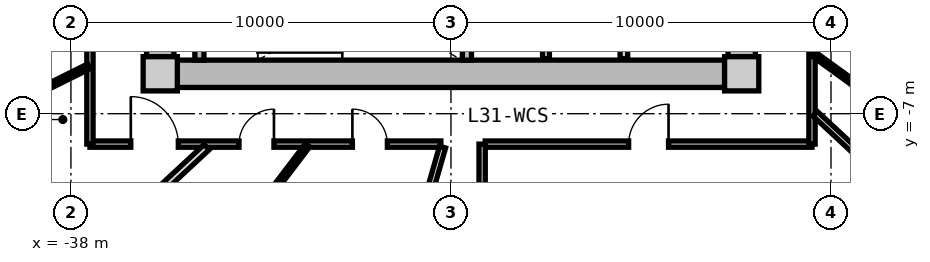
"""IFC4 building model, lengths in metres.
Left out: names, types, materials, properties, quantities, classifications, styles, units other than length and angle.
Written with IfcOpenShell. Run it as: python <this file> out.ifc"""

import sys

from ifc_helpers import new_model, si_unit, direction, frame, frame_2d, origin, origin_2d, place, context, subcontext, project, spatial, rectangle, extrude, source, transform, mapped, element, fill, save


model = new_model("IFC4")
c1 = context("Model", 3, precision=1e-05, world=origin(), true_north=direction((0.0, 1.0)))
c2 = subcontext(c1, "Body", "Model", "MODEL_VIEW")
j1 = project(units=[si_unit("LENGTHUNIT", "METRE"), si_unit("PLANEANGLEUNIT", "RADIAN")], contexts=[c1])
p1 = place(None, origin())
s1 = spatial("IfcSite", under=j1, at=p1, CompositionType="ELEMENT")
p2 = place(p1, origin())
s2 = spatial("IfcBuilding", under=s1, at=p2, CompositionType="ELEMENT")
p3 = place(p2, frame((0.0, 0.0, 102.35)))
s3 = spatial("IfcBuildingStorey", under=s2, at=p3, CompositionType="ELEMENT", Elevation=102.35)
m1 = source(origin(), c2, "Body", "SweptSolid", [
    extrude(rectangle(XDim=0.9, YDim=0.9, at=origin_2d()), origin(), (0.0, 0.0, 1.0), 3.05),
])
for number, where, z_axis, x_axis in (
    (1, (-35.65, -5.95, 0.0), (0.0, 0.0, 1.0), (1.0, 0.0, 0.0)),
    (2, (-20.35, -5.95, 0.0), (0.0, 0.0, 1.0), (1.0, 0.0, 0.0)),
):
    element("IfcColumn", number, at=place(p3, frame(where, z_axis=z_axis, x_axis=x_axis)), inside=s3, PredefinedType="COLUMN", context=c2, shape_type="MappedRepresentation", body=[
        mapped(m1, transform((0.0, 0.0, 0.0), x_axis=(1.0, 0.0, 0.0), y_axis=(0.0, 1.0, 0.0), z_axis=(0.0, 0.0, 1.0), scale=1.0)),
    ])
m2 = source(origin(), c2, "Body", "SweptSolid", [
    extrude(rectangle(XDim=14.4, YDim=0.72, at=frame_2d((7.2, 0.0))), origin(), (0.0, 0.0, 1.0), 2.79),
])
p4 = place(p3, frame((-20.8, -5.95, 0.0), z_axis=(0.0, 0.0, 1.0), x_axis=(-1.0, 0.0, 0.0)))
e3 = element("IfcWall", 3, at=p4, inside=s3, PredefinedType="SHEAR", context=c2, shape_type="MappedRepresentation", body=[
    mapped(m2, transform((0.0, 0.0, 0.0), x_axis=(1.0, 0.0, 0.0), y_axis=(0.0, 1.0, 0.0), z_axis=(0.0, 0.0, 1.0), scale=1.0)),
])
m3 = source(origin(), c2, "Body", "SweptSolid", [
    extrude(rectangle(XDim=11.0, YDim=0.72, at=frame_2d((5.5, 0.0))), origin(), (0.0, 0.0, 1.0), 2.79),
])
p5 = place(p3, frame((-35.65, -5.5, 0.0), z_axis=(0.0, 0.0, 1.0), x_axis=(0.0, 1.0, 0.0)))
e4 = element("IfcWall", 4, at=p5, inside=s3, PredefinedType="SHEAR", context=c2, shape_type="MappedRepresentation", body=[
    mapped(m3, transform((0.0, 0.0, 0.0), x_axis=(1.0, 0.0, 0.0), y_axis=(0.0, 1.0, 0.0), z_axis=(0.0, 0.0, 1.0), scale=1.0)),
])
p6 = place(p5, frame((3.8, 0.0, 0.0)))
e5 = element("IfcOpeningElement", 5, at=p6, cuts=e4, PredefinedType="OPENING", context=c2, shape_type="SweptSolid", body=[
    extrude(rectangle(XDim=1.2, YDim=2.15, at=frame_2d((0.6, 1.075))), frame((0.0, 0.37, 0.0), z_axis=(0.0, -1.0, 0.0), x_axis=(1.0, 0.0, 0.0)), (0.0, 0.0, 1.0), 0.74),
])
p7 = place(p3, frame((-20.35, 5.5, 0.0), z_axis=(0.0, 0.0, 1.0), x_axis=(0.0, -1.0, 0.0)))
e6 = element("IfcWall", 6, at=p7, inside=s3, PredefinedType="SHEAR", context=c2, shape_type="MappedRepresentation", body=[
    mapped(m3, transform((0.0, 0.0, 0.0), x_axis=(1.0, 0.0, 0.0), y_axis=(0.0, 1.0, 0.0), z_axis=(0.0, 0.0, 1.0), scale=1.0)),
])
p8 = place(p7, frame((5.65, 0.0, 0.0)))
e7 = element("IfcOpeningElement", 7, at=p8, cuts=e6, PredefinedType="OPENING", context=c2, shape_type="SweptSolid", body=[
    extrude(rectangle(XDim=1.2, YDim=2.15, at=frame_2d((0.6, 1.075))), frame((0.0, 0.37, 0.0), z_axis=(0.0, -1.0, 0.0), x_axis=(1.0, 0.0, 0.0)), (0.0, 0.0, 1.0), 0.74),
])
m4 = source(origin(), c2, "Body", "SweptSolid", [
    extrude(rectangle(XDim=3.14, YDim=0.24, at=frame_2d((1.57, 0.0))), origin(), (0.0, 0.0, 1.0), 2.79),
])
for number, where, z_axis, x_axis in (
    (8, (-34.62, -5.59, 0.0), (0.0, 0.0, 1.0), (0.0, 1.0, 0.0)),
    (9, (-27.58, -5.59, 0.0), (0.0, 0.0, 1.0), (0.0, 1.0, 0.0)),
):
    element("IfcWall", number, at=place(p3, frame(where, z_axis=z_axis, x_axis=x_axis)), inside=s3, PredefinedType="PARTITIONING", context=c2, shape_type="MappedRepresentation", body=[
        mapped(m4, transform((0.0, 0.0, 0.0), x_axis=(1.0, 0.0, 0.0), y_axis=(0.0, 1.0, 0.0), z_axis=(0.0, 0.0, 1.0), scale=1.0)),
    ])
m5 = source(origin(), c2, "Body", "SweptSolid", [
    extrude(rectangle(XDim=3.8, YDim=0.2, at=frame_2d((1.9, 0.0))), origin(), (0.0, 0.0, 1.0), 2.775),
])
p9 = place(p3, frame((-23.45, -5.55, 0.0), z_axis=(0.0, 0.0, 1.0), x_axis=(0.0, 1.0, 0.0)))
e10 = element("IfcWall", 10, at=p9, inside=s3, PredefinedType="PARTITIONING", context=c2, shape_type="MappedRepresentation", body=[
    mapped(m5, transform((0.0, 0.0, 0.0), x_axis=(1.0, 0.0, 0.0), y_axis=(0.0, 1.0, 0.0), z_axis=(0.0, 0.0, 1.0), scale=1.0)),
])
m6 = source(origin(), c2, "Body", "SweptSolid", [
    extrude(rectangle(XDim=3.22, YDim=0.18, at=frame_2d((1.61, 0.0))), origin(), (0.0, 0.0, 1.0), 2.775),
])
p10 = place(p3, frame((-25.5, -5.55, 0.0), z_axis=(0.0, 0.0, 1.0), x_axis=(0.0, 1.0, 0.0)))
e11 = element("IfcWall", 11, at=p10, inside=s3, PredefinedType="PARTITIONING", context=c2, shape_type="MappedRepresentation", body=[
    mapped(m6, transform((0.0, 0.0, 0.0), x_axis=(1.0, 0.0, 0.0), y_axis=(0.0, 1.0, 0.0), z_axis=(0.0, 0.0, 1.0), scale=1.0)),
])
m7 = source(origin(), c2, "Body", "SweptSolid", [
    extrude(rectangle(XDim=8.6, YDim=0.165, at=frame_2d((4.3, 0.0))), origin(), (0.0, 0.0, 1.0), 2.775),
])
p11 = place(p3, frame((-18.5, -7.8, 0.0), z_axis=(0.0, 0.0, 1.0), x_axis=(-1.0, 0.0, 0.0)))
e12 = element("IfcWall", 12, at=p11, inside=s3, PredefinedType="PARTITIONING", context=c2, shape_type="MappedRepresentation", body=[
    mapped(m7, transform((0.0, 0.0, 0.0), x_axis=(1.0, 0.0, 0.0), y_axis=(0.0, 1.0, 0.0), z_axis=(0.0, 0.0, 1.0), scale=1.0)),
])
p12 = place(p11, frame((3.775, 0.0, 0.0)))
e13 = element("IfcOpeningElement", 13, at=p12, cuts=e12, PredefinedType="OPENING", context=c2, shape_type="SweptSolid", body=[
    extrude(rectangle(XDim=1.05, YDim=2.15, at=frame_2d((0.525, 1.075))), frame((0.0, 0.093, 0.0), z_axis=(0.0, -1.0, 0.0), x_axis=(1.0, 0.0, 0.0)), (0.0, 0.0, 1.0), 0.185),
])
m8 = source(origin(), c2, "Body", "SweptSolid", [
    extrude(rectangle(XDim=9.234, YDim=0.165, at=frame_2d((4.617, 0.0))), origin(), (0.0, 0.0, 1.0), 2.775),
])
p13 = place(p3, frame((-28.266, -7.8, 0.0), z_axis=(0.0, 0.0, 1.0), x_axis=(-1.0, 0.0, 0.0)))
e14 = element("IfcWall", 14, at=p13, inside=s3, PredefinedType="PARTITIONING", context=c2, shape_type="MappedRepresentation", body=[
    mapped(m8, transform((0.0, 0.0, 0.0), x_axis=(1.0, 0.0, 0.0), y_axis=(0.0, 1.0, 0.0), z_axis=(0.0, 0.0, 1.0), scale=1.0)),
])
p14 = place(p13, frame((6.909, 0.0, 0.0)))
e15 = element("IfcOpeningElement", 15, at=p14, cuts=e14, PredefinedType="OPENING", context=c2, shape_type="SweptSolid", body=[
    extrude(rectangle(XDim=1.25, YDim=2.2, at=frame_2d((0.625, 1.1))), frame((0.0, 0.093, 0.0), z_axis=(0.0, -1.0, 0.0), x_axis=(1.0, 0.0, 0.0)), (0.0, 0.0, 1.0), 0.185),
])
p15 = place(p13, frame((4.392, 0.0, 0.0)))
e16 = element("IfcOpeningElement", 16, at=p15, cuts=e14, PredefinedType="OPENING", context=c2, shape_type="SweptSolid", body=[
    extrude(rectangle(XDim=0.92, YDim=2.1, at=frame_2d((0.46, 1.05))), frame((0.0, 0.093, 0.0), z_axis=(0.0, -1.0, 0.0), x_axis=(1.0, 0.0, 0.0)), (0.0, 0.0, 1.0), 0.185),
])
p16 = place(p13, frame((1.408, 0.0, 0.0)))
e17 = element("IfcOpeningElement", 17, at=p16, cuts=e14, PredefinedType="OPENING", context=c2, shape_type="SweptSolid", body=[
    extrude(rectangle(XDim=0.92, YDim=2.1, at=frame_2d((0.46, 1.05))), frame((0.0, 0.093, 0.0), z_axis=(0.0, -1.0, 0.0), x_axis=(1.0, 0.0, 0.0)), (0.0, 0.0, 1.0), 0.185),
])
m9 = source(origin(), c2, "Body", "SweptSolid", [
    extrude(rectangle(XDim=15.6, YDim=0.165, at=frame_2d((7.8, 0.0))), origin(), (0.0, 0.0, 1.0), 2.775),
])
p17 = place(p3, frame((-37.5, -7.8, 0.0), z_axis=(0.0, 0.0, 1.0), x_axis=(0.0, 1.0, 0.0)))
e18 = element("IfcWall", 18, at=p17, inside=s3, PredefinedType="PARTITIONING", context=c2, shape_type="MappedRepresentation", body=[
    mapped(m9, transform((0.0, 0.0, 0.0), x_axis=(1.0, 0.0, 0.0), y_axis=(0.0, 1.0, 0.0), z_axis=(0.0, 0.0, 1.0), scale=1.0)),
])
p18 = place(p17, frame((11.994, 0.0, 0.0)))
e19 = element("IfcOpeningElement", 19, at=p18, cuts=e18, PredefinedType="OPENING", context=c2, shape_type="SweptSolid", body=[
    extrude(rectangle(XDim=1.25, YDim=2.2, at=frame_2d((0.625, 1.1))), frame((0.0, 0.093, 0.0), z_axis=(0.0, -1.0, 0.0), x_axis=(1.0, 0.0, 0.0)), (0.0, 0.0, 1.0), 0.185),
])
p19 = place(p17, frame((7.984, 0.0, 0.0)))
e20 = element("IfcOpeningElement", 20, at=p19, cuts=e18, PredefinedType="OPENING", context=c2, shape_type="SweptSolid", body=[
    extrude(rectangle(XDim=1.05, YDim=2.15, at=frame_2d((0.525, 1.075))), frame((0.0, 0.093, 0.0), z_axis=(0.0, -1.0, 0.0), x_axis=(1.0, 0.0, 0.0)), (0.0, 0.0, 1.0), 0.185),
])
p20 = place(p17, frame((5.777, 0.0, 0.0)))
e21 = element("IfcOpeningElement", 21, at=p20, cuts=e18, PredefinedType="OPENING", context=c2, shape_type="SweptSolid", body=[
    extrude(rectangle(XDim=1.05, YDim=2.15, at=frame_2d((0.525, 1.075))), frame((0.0, 0.093, 0.0), z_axis=(0.0, -1.0, 0.0), x_axis=(1.0, 0.0, 0.0)), (0.0, 0.0, 1.0), 0.185),
])
p21 = place(p3, frame((-18.5, 7.8, 0.0), z_axis=(0.0, 0.0, 1.0), x_axis=(0.0, -1.0, 0.0)))
e22 = element("IfcWall", 22, at=p21, inside=s3, PredefinedType="PARTITIONING", context=c2, shape_type="MappedRepresentation", body=[
    mapped(m9, transform((0.0, 0.0, 0.0), x_axis=(1.0, 0.0, 0.0), y_axis=(0.0, 1.0, 0.0), z_axis=(0.0, 0.0, 1.0), scale=1.0)),
])
p22 = place(p21, frame((12.002, 0.0, 0.0)))
e23 = element("IfcOpeningElement", 23, at=p22, cuts=e22, PredefinedType="OPENING", context=c2, shape_type="SweptSolid", body=[
    extrude(rectangle(XDim=1.05, YDim=2.15, at=frame_2d((0.525, 1.075))), frame((0.0, 0.093, 0.0), z_axis=(0.0, -1.0, 0.0), x_axis=(1.0, 0.0, 0.0)), (0.0, 0.0, 1.0), 0.185),
])
p23 = place(p21, frame((10.211, 0.0, 0.0)))
e24 = element("IfcOpeningElement", 24, at=p23, cuts=e22, PredefinedType="OPENING", context=c2, shape_type="SweptSolid", body=[
    extrude(rectangle(XDim=1.05, YDim=2.15, at=frame_2d((0.525, 1.075))), frame((0.0, 0.093, 0.0), z_axis=(0.0, -1.0, 0.0), x_axis=(1.0, 0.0, 0.0)), (0.0, 0.0, 1.0), 0.185),
])
p24 = place(p21, frame((7.722, 0.0, 0.0)))
e25 = element("IfcOpeningElement", 25, at=p24, cuts=e22, PredefinedType="OPENING", context=c2, shape_type="SweptSolid", body=[
    extrude(rectangle(XDim=1.05, YDim=2.15, at=frame_2d((0.525, 1.075))), frame((0.0, 0.093, 0.0), z_axis=(0.0, -1.0, 0.0), x_axis=(1.0, 0.0, 0.0)), (0.0, 0.0, 1.0), 0.185),
])
p25 = place(p21, frame((6.291, 0.0, 0.0)))
e26 = element("IfcOpeningElement", 26, at=p25, cuts=e22, PredefinedType="OPENING", context=c2, shape_type="SweptSolid", body=[
    extrude(rectangle(XDim=1.05, YDim=2.15, at=frame_2d((0.525, 1.075))), frame((0.0, 0.093, 0.0), z_axis=(0.0, -1.0, 0.0), x_axis=(1.0, 0.0, 0.0)), (0.0, 0.0, 1.0), 0.185),
])
p26 = place(p21, frame((2.465, 0.0, 0.0)))
e27 = element("IfcOpeningElement", 27, at=p26, cuts=e22, PredefinedType="OPENING", context=c2, shape_type="SweptSolid", body=[
    extrude(rectangle(XDim=1.25, YDim=2.2, at=frame_2d((0.625, 1.1))), frame((0.0, 0.093, 0.0), z_axis=(0.0, -1.0, 0.0), x_axis=(1.0, 0.0, 0.0)), (0.0, 0.0, 1.0), 0.185),
])
m10 = source(origin(), c2, "Body", "SweptSolid", [
    extrude(rectangle(XDim=8.989, YDim=0.165, at=frame_2d((4.495, 0.0))), origin(), (0.0, 0.0, 1.0), 2.275),
])
p27 = place(p3, frame((-28.222, -7.88, 0.0), z_axis=(0.0, 0.0, 1.0), x_axis=(-0.27702323008, -0.960863221274, 0.0)))
e28 = element("IfcWall", 28, at=p27, inside=s3, PredefinedType="PARTITIONING", context=c2, shape_type="MappedRepresentation", body=[
    mapped(m10, transform((0.0, 0.0, 0.0), x_axis=(1.0, 0.0, 0.0), y_axis=(0.0, 1.0, 0.0), z_axis=(0.0, 0.0, 1.0), scale=1.0)),
])
m11 = source(origin(), c2, "Body", "SweptSolid", [
    extrude(rectangle(XDim=7.482, YDim=0.165, at=frame_2d((3.741, 0.0))), origin(), (0.0, 0.0, 1.0), 2.275),
])
p28 = place(p3, frame((-18.42, -6.998, 0.0), z_axis=(0.0, 0.0, 1.0), x_axis=(0.732508698043, -0.680757671489, 0.0)))
e29 = element("IfcWall", 29, at=p28, inside=s3, PredefinedType="PARTITIONING", context=c2, shape_type="MappedRepresentation", body=[
    mapped(m11, transform((0.0, 0.0, 0.0), x_axis=(1.0, 0.0, 0.0), y_axis=(0.0, 1.0, 0.0), z_axis=(0.0, 0.0, 1.0), scale=1.0)),
])
m12 = source(origin(), c2, "Body", "SweptSolid", [
    extrude(rectangle(XDim=7.56, YDim=0.165, at=frame_2d((3.78, 0.0))), origin(), (0.0, 0.0, 1.0), 2.775),
])
p29 = place(p3, frame((-27.18, -15.36, 0.0), z_axis=(0.0, 0.0, 1.0), x_axis=(0.0, 1.0, 0.0)))
e30 = element("IfcWall", 30, at=p29, inside=s3, PredefinedType="PARTITIONING", context=c2, shape_type="MappedRepresentation", body=[
    mapped(m12, transform((0.0, 0.0, 0.0), x_axis=(1.0, 0.0, 0.0), y_axis=(0.0, 1.0, 0.0), z_axis=(0.0, 0.0, 1.0), scale=1.0)),
])
m13 = source(origin(), c2, "Body", "SweptSolid", [
    extrude(rectangle(XDim=6.187, YDim=0.19, at=frame_2d((3.093, 0.0))), origin(), (0.0, 0.0, 1.0), 2.275),
])
p30 = place(p3, frame((-34.429, -7.88, 0.0), z_axis=(0.0, 0.0, 1.0), x_axis=(-0.732501077882, -0.680765870841, 0.0)))
e31 = element("IfcWall", 31, at=p30, inside=s3, PredefinedType="PARTITIONING", context=c2, shape_type="MappedRepresentation", body=[
    mapped(m13, transform((0.0, 0.0, 0.0), x_axis=(1.0, 0.0, 0.0), y_axis=(0.0, 1.0, 0.0), z_axis=(0.0, 0.0, 1.0), scale=1.0)),
])
m14 = source(origin(), c2, "Body", "SweptSolid", [
    extrude(rectangle(XDim=2.469, YDim=0.14, at=frame_2d((1.235, 0.0))), origin(), (0.0, 0.0, 1.0), 2.775),
])
p31 = place(p3, frame((-37.53, -5.754, 0.0), z_axis=(0.0, 0.0, 1.0), x_axis=(-0.895512172456, -0.445037019789, 0.0)))
e32 = element("IfcWall", 32, at=p31, inside=s3, PredefinedType="PARTITIONING", context=c2, shape_type="MappedRepresentation", body=[
    mapped(m14, transform((0.0, 0.0, 0.0), x_axis=(1.0, 0.0, 0.0), y_axis=(0.0, 1.0, 0.0), z_axis=(0.0, 0.0, 1.0), scale=1.0)),
])
m15 = source(origin(), c2, "Body", "SweptSolid", [
    extrude(rectangle(XDim=7.243, YDim=0.14, at=frame_2d((3.621, 0.0))), origin(), (0.0, 0.0, 1.0), 2.775),
])
p32 = place(p3, frame((-31.774, -7.83, 0.0), z_axis=(0.0, 0.0, 1.0), x_axis=(-0.605111472002, -0.796140757939, 0.0)))
e33 = element("IfcWall", 33, at=p32, inside=s3, PredefinedType="PARTITIONING", context=c2, shape_type="MappedRepresentation", body=[
    mapped(m15, transform((0.0, 0.0, 0.0), x_axis=(1.0, 0.0, 0.0), y_axis=(0.0, 1.0, 0.0), z_axis=(0.0, 0.0, 1.0), scale=1.0)),
])
m16 = source(origin(), c2, "Body", "SweptSolid", [
    extrude(rectangle(XDim=8.744, YDim=0.19, at=frame_2d((4.372, 0.0))), origin(), (0.0, 0.0, 1.0), 2.775),
])
p33 = place(p3, frame((-18.273, -4.142, 0.0), z_axis=(0.0, 0.0, 1.0), x_axis=(0.882252449936, -0.470776607938, 0.0)))
e34 = element("IfcWall", 34, at=p33, inside=s3, PredefinedType="PARTITIONING", context=c2, shape_type="MappedRepresentation", body=[
    mapped(m16, transform((0.0, 0.0, 0.0), x_axis=(1.0, 0.0, 0.0), y_axis=(0.0, 1.0, 0.0), z_axis=(0.0, 0.0, 1.0), scale=1.0)),
])
m17 = source(origin(), c2, "Body", "SweptSolid", [
    extrude(rectangle(XDim=3.621, YDim=0.14, at=frame_2d((1.811, 0.0))), origin(), (0.0, 0.0, 1.0), 2.775),
])
p34 = place(p3, frame((-18.47, -5.422, 0.0), z_axis=(0.0, 0.0, 1.0), x_axis=(0.80968252222, -0.586868139544, 0.0)))
e35 = element("IfcWall", 35, at=p34, inside=s3, PredefinedType="PARTITIONING", context=c2, shape_type="MappedRepresentation", body=[
    mapped(m17, transform((0.0, 0.0, 0.0), x_axis=(1.0, 0.0, 0.0), y_axis=(0.0, 1.0, 0.0), z_axis=(0.0, 0.0, 1.0), scale=1.0)),
])
p35 = place(p34, frame((1.351, 0.0, 0.0)))
e36 = element("IfcOpeningElement", 36, at=p35, cuts=e35, PredefinedType="OPENING", context=c2, shape_type="SweptSolid", body=[
    extrude(rectangle(XDim=0.92, YDim=2.1, at=frame_2d((0.46, 1.05))), frame((0.0, 0.08, 0.0), z_axis=(0.0, -1.0, 0.0), x_axis=(1.0, 0.0, 0.0)), (0.0, 0.0, 1.0), 0.16),
])
m18 = source(origin(), c2, "Body", "SweptSolid", [
    extrude(rectangle(XDim=1.05, YDim=2.15, at=frame_2d((0.525, 1.075))), frame((0.0, 0.025, 0.0), z_axis=(0.0, -1.0, 0.0), x_axis=(1.0, 0.0, 0.0)), (0.0, 0.0, 1.0), 0.05),
])
p36 = place(p12, frame((1.05, 0.0, 0.0), z_axis=(0.0, 0.0, 1.0), x_axis=(-1.0, 0.0, 0.0)))
e37 = element("IfcDoor", 37, at=p36, inside=s3, OperationType="SINGLE_SWING_RIGHT", PredefinedType="DOOR", context=c2, shape_type="MappedRepresentation", body=[
    mapped(m18, transform((0.0, 0.0, 0.0), x_axis=(1.0, 0.0, 0.0), y_axis=(0.0, 1.0, 0.0), z_axis=(0.0, 0.0, 1.0), scale=1.0)),
])
fill(e13, e37)
m19 = source(origin(), c2, "Body", "SweptSolid", [
    extrude(rectangle(XDim=1.25, YDim=2.2, at=frame_2d((0.625, 1.1))), frame((0.0, 0.025, 0.0), z_axis=(0.0, -1.0, 0.0), x_axis=(1.0, 0.0, 0.0)), (0.0, 0.0, 1.0), 0.05),
])
p37 = place(p14, frame((1.25, 0.0, 0.0), z_axis=(0.0, 0.0, 1.0), x_axis=(-1.0, 0.0, 0.0)))
e38 = element("IfcDoor", 38, at=p37, inside=s3, OperationType="SINGLE_SWING_LEFT", PredefinedType="DOOR", context=c2, shape_type="MappedRepresentation", body=[
    mapped(m19, transform((0.0, 0.0, 0.0), x_axis=(1.0, 0.0, 0.0), y_axis=(0.0, 1.0, 0.0), z_axis=(0.0, 0.0, 1.0), scale=1.0)),
])
fill(e15, e38)
m20 = source(origin(), c2, "Body", "SweptSolid", [
    extrude(rectangle(XDim=0.92, YDim=2.1, at=frame_2d((0.46, 1.05))), frame((0.0, 0.025, 0.0), z_axis=(0.0, -1.0, 0.0), x_axis=(1.0, 0.0, 0.0)), (0.0, 0.0, 1.0), 0.05),
])
p38 = place(p15, frame((0.92, 0.0, 0.0), z_axis=(0.0, 0.0, 1.0), x_axis=(-1.0, 0.0, 0.0)))
e39 = element("IfcDoor", 39, at=p38, inside=s3, OperationType="SINGLE_SWING_RIGHT", PredefinedType="DOOR", context=c2, shape_type="MappedRepresentation", body=[
    mapped(m20, transform((0.0, 0.0, 0.0), x_axis=(1.0, 0.0, 0.0), y_axis=(0.0, 1.0, 0.0), z_axis=(0.0, 0.0, 1.0), scale=1.0)),
])
fill(e16, e39)
p39 = place(p16, frame((0.92, 0.0, 0.0), z_axis=(0.0, 0.0, 1.0), x_axis=(-1.0, 0.0, 0.0)))
e40 = element("IfcDoor", 40, at=p39, inside=s3, OperationType="SINGLE_SWING_LEFT", PredefinedType="DOOR", context=c2, shape_type="MappedRepresentation", body=[
    mapped(m20, transform((0.0, 0.0, 0.0), x_axis=(1.0, 0.0, 0.0), y_axis=(0.0, 1.0, 0.0), z_axis=(0.0, 0.0, 1.0), scale=1.0)),
])
fill(e17, e40)
save(model, sys.argv[1])
